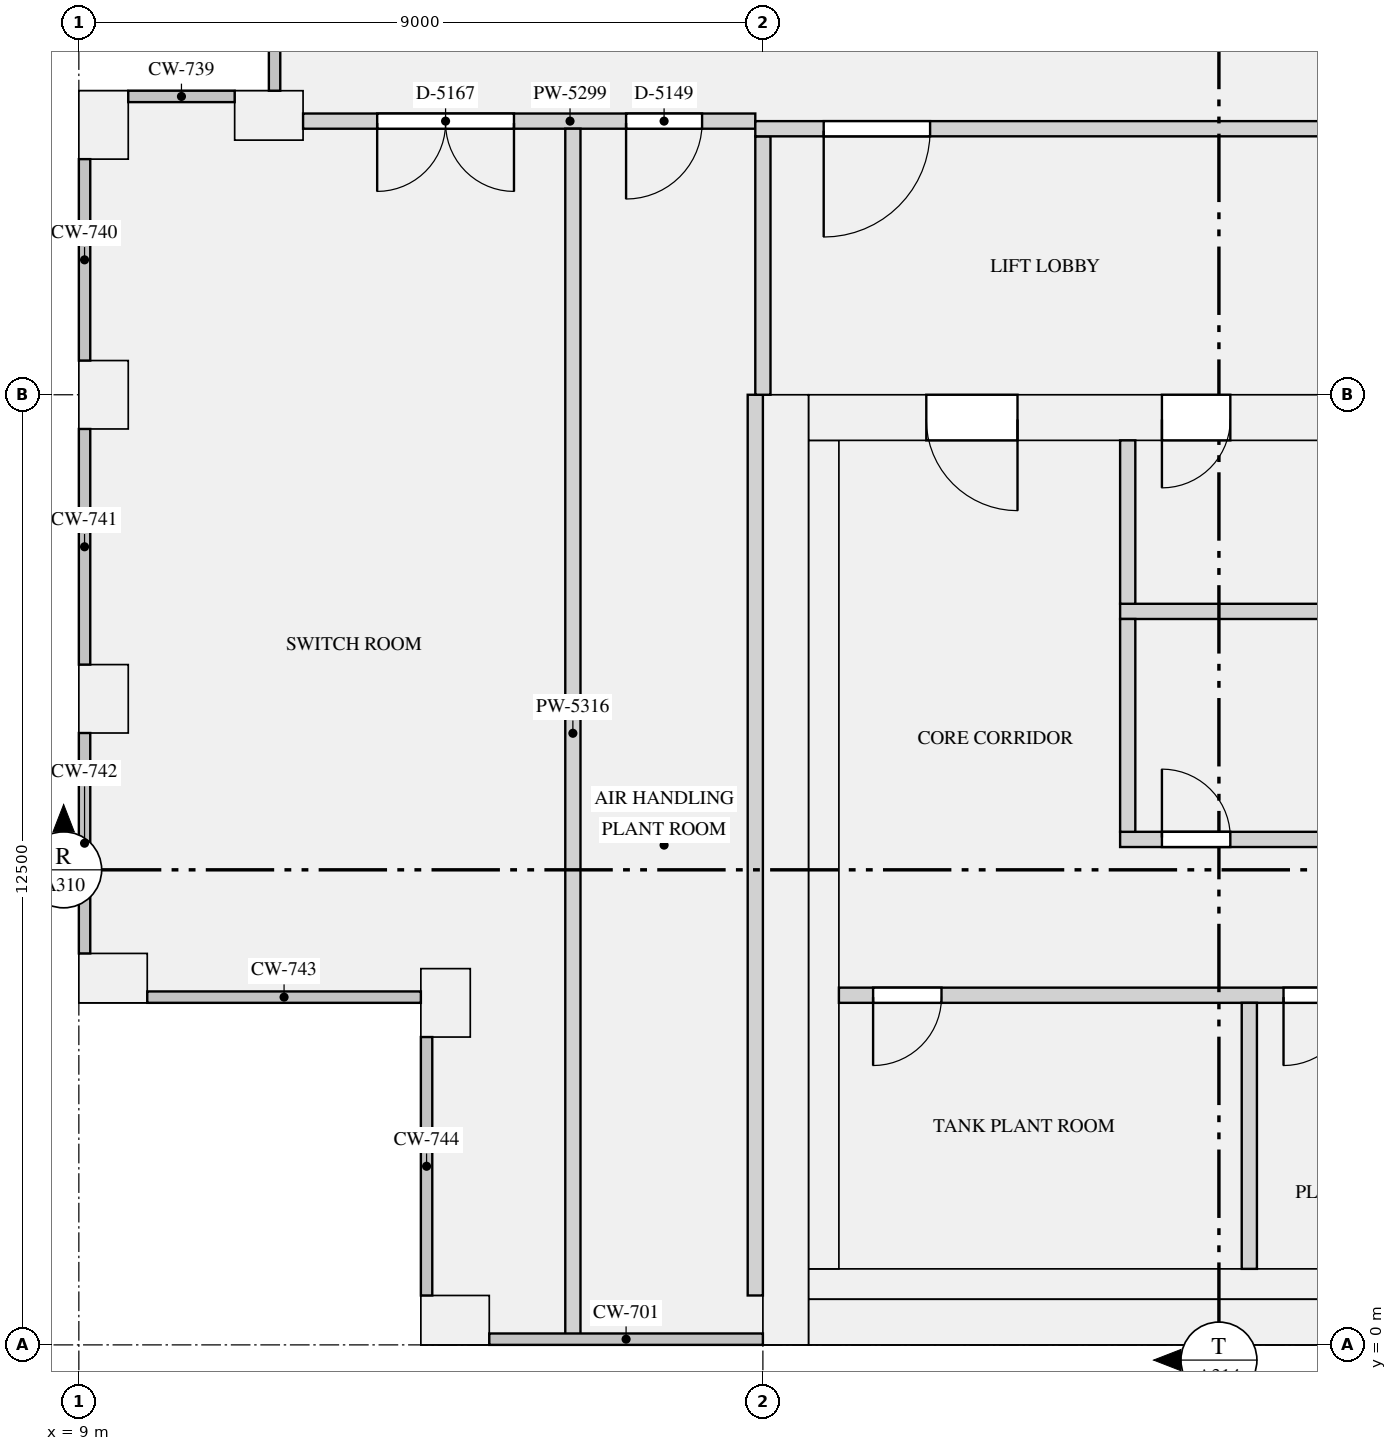
"""IFC4 building model, lengths in metres.
Left out: names, types, materials, properties, quantities, classifications, styles, units other than length and angle.
Written with IfcOpenShell. Run it as: python <this file> out.ifc"""

import sys

from ifc_helpers import new_model, si_unit, direction, frame, frame_2d, origin, origin_2d, place, context, subcontext, project, spatial, rectangle, extrude, element, fill, save


model = new_model("IFC4")
c1 = context("Model", 3, precision=1e-05, world=origin(), true_north=direction((0.0, 1.0)))
c2 = subcontext(c1, "Body", "Model", "MODEL_VIEW")
j1 = project(units=[si_unit("LENGTHUNIT", "METRE"), si_unit("PLANEANGLEUNIT", "RADIAN")], contexts=[c1])
p1 = place(None, origin())
s1 = spatial("IfcSite", under=j1, at=p1, CompositionType="ELEMENT")
p2 = place(p1, origin())
s2 = spatial("IfcBuilding", under=s1, at=p2, CompositionType="ELEMENT")
p3 = place(p2, frame((0.0, 0.0, 240.0)))
s3 = spatial("IfcBuildingStorey", under=s2, at=p3, CompositionType="ELEMENT", Elevation=240.0)
for number, where, z_axis, x_axis in (
    (1, (13.95, 0.325, 0.0), (0.0, 0.0, 1.0), (1.0, 0.0, 0.0)),
    (2, (11.5, 16.175, 0.0), (0.0, 0.0, 1.0), (-1.0, 0.0, 0.0)),
    (3, (9.325, 16.05, 0.0), (0.0, 0.0, 1.0), (0.0, -1.0, 0.0)),
    (4, (9.325, 12.5, 0.0), (0.0, 0.0, 1.0), (0.0, -1.0, 0.0)),
    (5, (9.325, 8.5, 0.0), (0.0, 0.0, 1.0), (0.0, -1.0, 0.0)),
    (6, (9.45, 4.825, 0.0), (0.0, 0.0, 1.0), (1.0, 0.0, 0.0)),
    (7, (13.825, 4.5, 0.0), (0.0, 0.0, 1.0), (0.0, -1.0, 0.0)),
):
    element("IfcColumn", number, at=place(p3, frame(where, z_axis=z_axis, x_axis=x_axis)), inside=s3, PredefinedType="USERDEFINED", context=c2, shape_type="SweptSolid", body=[
        extrude(rectangle(XDim=0.9, YDim=0.65, at=origin_2d()), origin(), (0.0, 0.0, 1.0), 4.2),
    ])
p4 = place(p3, frame((18.3, 0.0, 0.0), z_axis=(0.0, 0.0, 1.0), x_axis=(0.0, 1.0, 0.0)))
e8 = element("IfcWall", 8, at=p4, inside=s3, PredefinedType="SHEAR", context=c2, shape_type="SweptSolid", body=[
    extrude(rectangle(XDim=12.5, YDim=0.6, at=frame_2d((6.25, 0.0))), origin(), (0.0, 0.0, 1.0), 4.2),
])
p5 = place(p3, frame((18.6, 0.3, 0.0), z_axis=(0.0, 0.0, 1.0), x_axis=(1.0, 0.0, 0.0)))
e9 = element("IfcWall", 9, at=p5, inside=s3, PredefinedType="SHEAR", context=c2, shape_type="SweptSolid", body=[
    extrude(rectangle(XDim=34.8, YDim=0.6, at=frame_2d((17.4, 0.0))), origin(), (0.0, 0.0, 1.0), 4.2),
])
p6 = place(p3, frame((18.6, 12.2, 0.0), z_axis=(0.0, 0.0, 1.0), x_axis=(1.0, 0.0, 0.0)))
e10 = element("IfcWall", 10, at=p6, inside=s3, PredefinedType="SHEAR", context=c2, shape_type="SweptSolid", body=[
    extrude(rectangle(XDim=34.8, YDim=0.6, at=frame_2d((17.4, 0.0))), origin(), (0.0, 0.0, 1.0), 4.2),
])
p7 = place(p6, frame((24.575, 0.0, 0.0)))
e11 = element("IfcOpeningElement", 11, at=p7, cuts=e10, PredefinedType="OPENING", context=c2, shape_type="SweptSolid", body=[
    extrude(rectangle(XDim=1.1, YDim=2.1, at=frame_2d((0.55, 1.05))), frame((0.0, 0.31, 0.0), z_axis=(0.0, -1.0, 0.0), x_axis=(1.0, 0.0, 0.0)), (0.0, 0.0, 1.0), 0.62),
])
p8 = place(p6, frame((26.825, 0.0, 0.0)))
e12 = element("IfcOpeningElement", 12, at=p8, cuts=e10, PredefinedType="OPENING", context=c2, shape_type="SweptSolid", body=[
    extrude(rectangle(XDim=1.1, YDim=2.1, at=frame_2d((0.55, 1.05))), frame((0.0, 0.31, 0.0), z_axis=(0.0, -1.0, 0.0), x_axis=(1.0, 0.0, 0.0)), (0.0, 0.0, 1.0), 0.62),
])
p9 = place(p6, frame((29.075, 0.0, 0.0)))
e13 = element("IfcOpeningElement", 13, at=p9, cuts=e10, PredefinedType="OPENING", context=c2, shape_type="SweptSolid", body=[
    extrude(rectangle(XDim=1.1, YDim=2.1, at=frame_2d((0.55, 1.05))), frame((0.0, 0.31, 0.0), z_axis=(0.0, -1.0, 0.0), x_axis=(1.0, 0.0, 0.0)), (0.0, 0.0, 1.0), 0.62),
])
p10 = place(p6, frame((18.6, 0.0, 0.0)))
e14 = element("IfcOpeningElement", 14, at=p10, cuts=e10, PredefinedType="OPENING", context=c2, shape_type="SweptSolid", body=[
    extrude(rectangle(XDim=0.9, YDim=2.1, at=frame_2d((0.45, 1.05))), frame((0.0, 0.31, 0.0), z_axis=(0.0, -1.0, 0.0), x_axis=(1.0, 0.0, 0.0)), (0.0, 0.0, 1.0), 0.62),
])
p11 = place(p6, frame((4.65, 0.0, 0.0)))
e15 = element("IfcOpeningElement", 15, at=p11, cuts=e10, PredefinedType="OPENING", context=c2, shape_type="SweptSolid", body=[
    extrude(rectangle(XDim=0.9, YDim=2.1, at=frame_2d((0.45, 1.05))), frame((0.0, 0.31, 0.0), z_axis=(0.0, -1.0, 0.0), x_axis=(1.0, 0.0, 0.0)), (0.0, 0.0, 1.0), 0.62),
])
p12 = place(p6, frame((1.55, 0.0, 0.0)))
e16 = element("IfcOpeningElement", 16, at=p12, cuts=e10, PredefinedType="OPENING", context=c2, shape_type="SweptSolid", body=[
    extrude(rectangle(XDim=1.2, YDim=2.1, at=frame_2d((0.6, 1.05))), frame((0.0, 0.31, 0.0), z_axis=(0.0, -1.0, 0.0), x_axis=(1.0, 0.0, 0.0)), (0.0, 0.0, 1.0), 0.62),
])
p13 = place(p6, frame((32.05, 0.0, 0.0)))
e17 = element("IfcOpeningElement", 17, at=p13, cuts=e10, PredefinedType="OPENING", context=c2, shape_type="SweptSolid", body=[
    extrude(rectangle(XDim=1.2, YDim=2.1, at=frame_2d((0.6, 1.05))), frame((0.0, 0.31, 0.0), z_axis=(0.0, -1.0, 0.0), x_axis=(1.0, 0.0, 0.0)), (0.0, 0.0, 1.0), 0.62),
])
p14 = place(p3, frame((18.8, 1.0, 0.0), z_axis=(0.0, 0.0, 1.0), x_axis=(0.0, 1.0, 0.0)))
e18 = element("IfcWall", 18, at=p14, inside=s3, PredefinedType="SHEAR", context=c2, shape_type="SweptSolid", body=[
    extrude(rectangle(XDim=10.9, YDim=0.4, at=frame_2d((5.45, 0.0))), origin(), (0.0, 0.0, 1.0), 4.2),
])
p15 = place(p3, frame((18.6, 0.8, 0.0), z_axis=(0.0, 0.0, 1.0), x_axis=(1.0, 0.0, 0.0)))
e19 = element("IfcWall", 19, at=p15, inside=s3, PredefinedType="SHEAR", context=c2, shape_type="SweptSolid", body=[
    extrude(rectangle(XDim=34.8, YDim=0.4, at=frame_2d((17.4, 0.0))), origin(), (0.0, 0.0, 1.0), 4.2),
])
p16 = place(p3, frame((19.0, 4.6, 0.0), z_axis=(0.0, 0.0, 1.0), x_axis=(1.0, 0.0, 0.0)))
e20 = element("IfcWall", 20, at=p16, inside=s3, PredefinedType="PARTITIONING", context=c2, shape_type="SweptSolid", body=[
    extrude(rectangle(XDim=12.8, YDim=0.2, at=frame_2d((6.4, 0.0))), origin(), (0.0, 0.0, 1.0), 3.85),
])
p17 = place(p16, frame((0.45, 0.0, 0.0)))
e21 = element("IfcOpeningElement", 21, at=p17, cuts=e20, PredefinedType="OPENING", context=c2, shape_type="SweptSolid", body=[
    extrude(rectangle(XDim=0.9, YDim=2.1, at=frame_2d((0.45, 1.05))), frame((0.0, 0.11, 0.0), z_axis=(0.0, -1.0, 0.0), x_axis=(1.0, 0.0, 0.0)), (0.0, 0.0, 1.0), 0.22),
])
p18 = place(p16, frame((5.85, 0.0, 0.0)))
e22 = element("IfcOpeningElement", 22, at=p18, cuts=e20, PredefinedType="OPENING", context=c2, shape_type="SweptSolid", body=[
    extrude(rectangle(XDim=0.9, YDim=2.1, at=frame_2d((0.45, 1.05))), frame((0.0, 0.11, 0.0), z_axis=(0.0, -1.0, 0.0), x_axis=(1.0, 0.0, 0.0)), (0.0, 0.0, 1.0), 0.22),
])
p19 = place(p16, frame((9.05, 0.0, 0.0)))
e23 = element("IfcOpeningElement", 23, at=p19, cuts=e20, PredefinedType="OPENING", context=c2, shape_type="SweptSolid", body=[
    extrude(rectangle(XDim=0.9, YDim=2.1, at=frame_2d((0.45, 1.05))), frame((0.0, 0.11, 0.0), z_axis=(0.0, -1.0, 0.0), x_axis=(1.0, 0.0, 0.0)), (0.0, 0.0, 1.0), 0.22),
])
p20 = place(p16, frame((11.25, 0.0, 0.0)))
e24 = element("IfcOpeningElement", 24, at=p20, cuts=e20, PredefinedType="OPENING", context=c2, shape_type="SweptSolid", body=[
    extrude(rectangle(XDim=0.9, YDim=2.1, at=frame_2d((0.45, 1.05))), frame((0.0, 0.11, 0.0), z_axis=(0.0, -1.0, 0.0), x_axis=(1.0, 0.0, 0.0)), (0.0, 0.0, 1.0), 0.22),
])
p21 = place(p3, frame((22.7, 6.65, 0.0), z_axis=(0.0, 0.0, 1.0), x_axis=(1.0, 0.0, 0.0)))
e25 = element("IfcWall", 25, at=p21, inside=s3, PredefinedType="PARTITIONING", context=c2, shape_type="SweptSolid", body=[
    extrude(rectangle(XDim=19.85, YDim=0.2, at=frame_2d((9.925, 0.0))), origin(), (0.0, 0.0, 1.0), 3.85),
])
p22 = place(p21, frame((14.5, 0.0, 0.0)))
e26 = element("IfcOpeningElement", 26, at=p22, cuts=e25, PredefinedType="OPENING", context=c2, shape_type="SweptSolid", body=[
    extrude(rectangle(XDim=0.9, YDim=2.1, at=frame_2d((0.45, 1.05))), frame((0.0, 0.11, 0.0), z_axis=(0.0, -1.0, 0.0), x_axis=(1.0, 0.0, 0.0)), (0.0, 0.0, 1.0), 0.22),
])
p23 = place(p21, frame((0.55, 0.0, 0.0)))
e27 = element("IfcOpeningElement", 27, at=p23, cuts=e25, PredefinedType="OPENING", context=c2, shape_type="SweptSolid", body=[
    extrude(rectangle(XDim=0.9, YDim=2.1, at=frame_2d((0.45, 1.05))), frame((0.0, 0.11, 0.0), z_axis=(0.0, -1.0, 0.0), x_axis=(1.0, 0.0, 0.0)), (0.0, 0.0, 1.0), 0.22),
])
p24 = place(p3, frame((22.7, 9.65, 0.0), z_axis=(0.0, 0.0, 1.0), x_axis=(1.0, 0.0, 0.0)))
e28 = element("IfcWall", 28, at=p24, inside=s3, PredefinedType="PARTITIONING", context=c2, shape_type="SweptSolid", body=[
    extrude(rectangle(XDim=14.15, YDim=0.2, at=frame_2d((7.075, 0.0))), origin(), (0.0, 0.0, 1.0), 3.85),
])
p25 = place(p3, frame((24.4, 1.0, 0.0), z_axis=(0.0, 0.0, 1.0), x_axis=(0.0, 1.0, 0.0)))
e29 = element("IfcWall", 29, at=p25, inside=s3, PredefinedType="PARTITIONING", context=c2, shape_type="SweptSolid", body=[
    extrude(rectangle(XDim=3.5, YDim=0.2, at=frame_2d((1.75, 0.0))), origin(), (0.0, 0.0, 1.0), 3.85),
])
p26 = place(p3, frame((22.8, 6.75, 0.0), z_axis=(0.0, 0.0, 1.0), x_axis=(0.0, 1.0, 0.0)))
e30 = element("IfcWall", 30, at=p26, inside=s3, PredefinedType="PARTITIONING", context=c2, shape_type="SweptSolid", body=[
    extrude(rectangle(XDim=2.8, YDim=0.2, at=frame_2d((1.4, 0.0))), origin(), (0.0, 0.0, 1.0), 3.85),
])
p27 = place(p3, frame((22.8, 9.75, 0.0), z_axis=(0.0, 0.0, 1.0), x_axis=(0.0, 1.0, 0.0)))
e31 = element("IfcWall", 31, at=p27, inside=s3, PredefinedType="PARTITIONING", context=c2, shape_type="SweptSolid", body=[
    extrude(rectangle(XDim=2.15, YDim=0.2, at=frame_2d((1.075, 0.0))), origin(), (0.0, 0.0, 1.0), 3.85),
])
p28 = place(p3, frame((18.0, 12.5, 0.0), z_axis=(0.0, 0.0, 1.0), x_axis=(0.0, 1.0, 0.0)))
e32 = element("IfcWall", 32, at=p28, inside=s3, PredefinedType="PARTITIONING", context=c2, shape_type="SweptSolid", body=[
    extrude(rectangle(XDim=3.4, YDim=0.2, at=frame_2d((1.7, 0.0))), origin(), (0.0, 0.0, 1.0), 3.85),
])
p29 = place(p3, frame((17.9, 16.0, 0.0), z_axis=(0.0, 0.0, 1.0), x_axis=(1.0, 0.0, 0.0)))
e33 = element("IfcWall", 33, at=p29, inside=s3, PredefinedType="PARTITIONING", context=c2, shape_type="SweptSolid", body=[
    extrude(rectangle(XDim=36.2, YDim=0.2, at=frame_2d((18.1, 0.0))), origin(), (0.0, 0.0, 1.0), 3.85),
])
p30 = place(p29, frame((0.9, 0.0, 0.0)))
e34 = element("IfcOpeningElement", 34, at=p30, cuts=e33, PredefinedType="OPENING", context=c2, shape_type="SweptSolid", body=[
    extrude(rectangle(XDim=1.4, YDim=2.1, at=frame_2d((0.7, 1.05))), frame((0.0, 0.11, 0.0), z_axis=(0.0, -1.0, 0.0), x_axis=(1.0, 0.0, 0.0)), (0.0, 0.0, 1.0), 0.22),
])
p31 = place(p29, frame((33.9, 0.0, 0.0)))
e35 = element("IfcOpeningElement", 35, at=p31, cuts=e33, PredefinedType="OPENING", context=c2, shape_type="SweptSolid", body=[
    extrude(rectangle(XDim=1.4, YDim=2.1, at=frame_2d((0.7, 1.05))), frame((0.0, 0.11, 0.0), z_axis=(0.0, -1.0, 0.0), x_axis=(1.0, 0.0, 0.0)), (0.0, 0.0, 1.0), 0.22),
])
p32 = place(p3, frame((11.95, 16.1, 0.0), z_axis=(0.0, 0.0, 1.0), x_axis=(1.0, 0.0, 0.0)))
e36 = element("IfcWall", 36, at=p32, inside=s3, PredefinedType="PARTITIONING", context=c2, shape_type="SweptSolid", body=[
    extrude(rectangle(XDim=5.95, YDim=0.2, at=frame_2d((2.975, 0.0))), origin(), (0.0, 0.0, 1.0), 3.85),
])
p33 = place(p32, frame((0.975, 0.0, 0.0)))
e37 = element("IfcOpeningElement", 37, at=p33, cuts=e36, PredefinedType="OPENING", context=c2, shape_type="SweptSolid", body=[
    extrude(rectangle(XDim=1.8, YDim=2.1, at=frame_2d((0.9, 1.05))), frame((0.0, 0.11, 0.0), z_axis=(0.0, -1.0, 0.0), x_axis=(1.0, 0.0, 0.0)), (0.0, 0.0, 1.0), 0.22),
])
p34 = place(p32, frame((4.25, 0.0, 0.0)))
e38 = element("IfcOpeningElement", 38, at=p34, cuts=e36, PredefinedType="OPENING", context=c2, shape_type="SweptSolid", body=[
    extrude(rectangle(XDim=1.0, YDim=2.1, at=frame_2d((0.5, 1.05))), frame((0.0, 0.11, 0.0), z_axis=(0.0, -1.0, 0.0), x_axis=(1.0, 0.0, 0.0)), (0.0, 0.0, 1.0), 0.22),
])
p35 = place(p3, frame((15.5, 0.093, 0.0), z_axis=(0.0, 0.0, 1.0), x_axis=(0.0, 1.0, 0.0)))
e39 = element("IfcWall", 39, at=p35, inside=s3, PredefinedType="PARTITIONING", context=c2, shape_type="SweptSolid", body=[
    extrude(rectangle(XDim=15.907, YDim=0.2, at=frame_2d((7.954, 0.0))), origin(), (0.0, 0.0, 1.0), 3.85),
])
p36 = place(p3, frame((17.9, 0.65, 0.0), z_axis=(0.0, 0.0, 1.0), x_axis=(0.0, 1.0, 0.0)))
e40 = element("IfcWall", 40, at=p36, inside=s3, PredefinedType="PARTITIONING", context=c2, shape_type="SweptSolid", body=[
    extrude(rectangle(XDim=11.85, YDim=0.2, at=frame_2d((5.925, 0.0))), origin(), (0.0, 0.0, 1.0), 3.85),
])
p37 = place(p17, frame((0.9, 0.0, 0.0), z_axis=(0.0, 0.0, 1.0), x_axis=(-1.0, 0.0, 0.0)))
e41 = element("IfcDoor", 41, at=p37, inside=s3, OperationType="SINGLE_SWING_RIGHT", PredefinedType="DOOR", context=c2, shape_type="SweptSolid", body=[
    extrude(rectangle(XDim=0.9, YDim=2.1, at=frame_2d((0.45, 1.05))), frame((0.0, 0.025, 0.0), z_axis=(0.0, -1.0, 0.0), x_axis=(1.0, 0.0, 0.0)), (0.0, 0.0, 1.0), 0.05),
])
fill(e21, e41)
p38 = place(p18, frame((0.9, 0.0, 0.0), z_axis=(0.0, 0.0, 1.0), x_axis=(-1.0, 0.0, 0.0)))
e42 = element("IfcDoor", 42, at=p38, inside=s3, OperationType="SINGLE_SWING_RIGHT", PredefinedType="DOOR", context=c2, shape_type="SweptSolid", body=[
    extrude(rectangle(XDim=0.9, YDim=2.1, at=frame_2d((0.45, 1.05))), frame((0.0, 0.025, 0.0), z_axis=(0.0, -1.0, 0.0), x_axis=(1.0, 0.0, 0.0)), (0.0, 0.0, 1.0), 0.05),
])
fill(e22, e42)
p39 = place(p11, frame((0.9, 0.0, 0.0), z_axis=(0.0, 0.0, 1.0), x_axis=(-1.0, 0.0, 0.0)))
e43 = element("IfcDoor", 43, at=p39, inside=s3, OperationType="SINGLE_SWING_RIGHT", PredefinedType="DOOR", context=c2, shape_type="SweptSolid", body=[
    extrude(rectangle(XDim=0.9, YDim=2.1, at=frame_2d((0.45, 1.05))), frame((0.0, 0.025, 0.0), z_axis=(0.0, -1.0, 0.0), x_axis=(1.0, 0.0, 0.0)), (0.0, 0.0, 1.0), 0.05),
])
fill(e15, e43)
p40 = place(p23, origin())
e44 = element("IfcDoor", 44, at=p40, inside=s3, OperationType="SINGLE_SWING_LEFT", PredefinedType="DOOR", context=c2, shape_type="SweptSolid", body=[
    extrude(rectangle(XDim=0.9, YDim=2.1, at=frame_2d((0.45, 1.05))), frame((0.0, 0.025, 0.0), z_axis=(0.0, -1.0, 0.0), x_axis=(1.0, 0.0, 0.0)), (0.0, 0.0, 1.0), 0.05),
])
fill(e27, e44)
p41 = place(p12, frame((1.2, 0.0, 0.0), z_axis=(0.0, 0.0, 1.0), x_axis=(-1.0, 0.0, 0.0)))
e45 = element("IfcDoor", 45, at=p41, inside=s3, OperationType="SINGLE_SWING_LEFT", PredefinedType="DOOR", context=c2, shape_type="SweptSolid", body=[
    extrude(rectangle(XDim=1.2, YDim=2.1, at=frame_2d((0.6, 1.05))), frame((0.0, 0.025, 0.0), z_axis=(0.0, -1.0, 0.0), x_axis=(1.0, 0.0, 0.0)), (0.0, 0.0, 1.0), 0.05),
])
fill(e16, e45)
p42 = place(p30, frame((1.4, 0.0, 0.0), z_axis=(0.0, 0.0, 1.0), x_axis=(-1.0, 0.0, 0.0)))
e46 = element("IfcDoor", 46, at=p42, inside=s3, OperationType="SINGLE_SWING_RIGHT", PredefinedType="DOOR", context=c2, shape_type="SweptSolid", body=[
    extrude(rectangle(XDim=1.4, YDim=2.1, at=frame_2d((0.7, 1.05))), frame((0.0, 0.025, 0.0), z_axis=(0.0, -1.0, 0.0), x_axis=(1.0, 0.0, 0.0)), (0.0, 0.0, 1.0), 0.05),
])
fill(e34, e46)
p43 = place(p33, frame((1.8, 0.0, 0.0), z_axis=(0.0, 0.0, 1.0), x_axis=(-1.0, 0.0, 0.0)))
e47 = element("IfcDoor", 47, at=p43, inside=s3, OperationType="DOUBLE_DOOR_SINGLE_SWING", PredefinedType="DOOR", context=c2, shape_type="SweptSolid", body=[
    extrude(rectangle(XDim=1.8, YDim=2.1, at=frame_2d((0.9, 1.05))), frame((0.0, 0.025, 0.0), z_axis=(0.0, -1.0, 0.0), x_axis=(1.0, 0.0, 0.0)), (0.0, 0.0, 1.0), 0.05),
])
fill(e37, e47)
p44 = place(p34, frame((1.0, 0.0, 0.0), z_axis=(0.0, 0.0, 1.0), x_axis=(-1.0, 0.0, 0.0)))
e48 = element("IfcDoor", 48, at=p44, inside=s3, OperationType="SINGLE_SWING_RIGHT", PredefinedType="DOOR", context=c2, shape_type="SweptSolid", body=[
    extrude(rectangle(XDim=1.0, YDim=2.1, at=frame_2d((0.5, 1.05))), frame((0.0, 0.025, 0.0), z_axis=(0.0, -1.0, 0.0), x_axis=(1.0, 0.0, 0.0)), (0.0, 0.0, 1.0), 0.05),
])
fill(e38, e48)
save(model, sys.argv[1])
